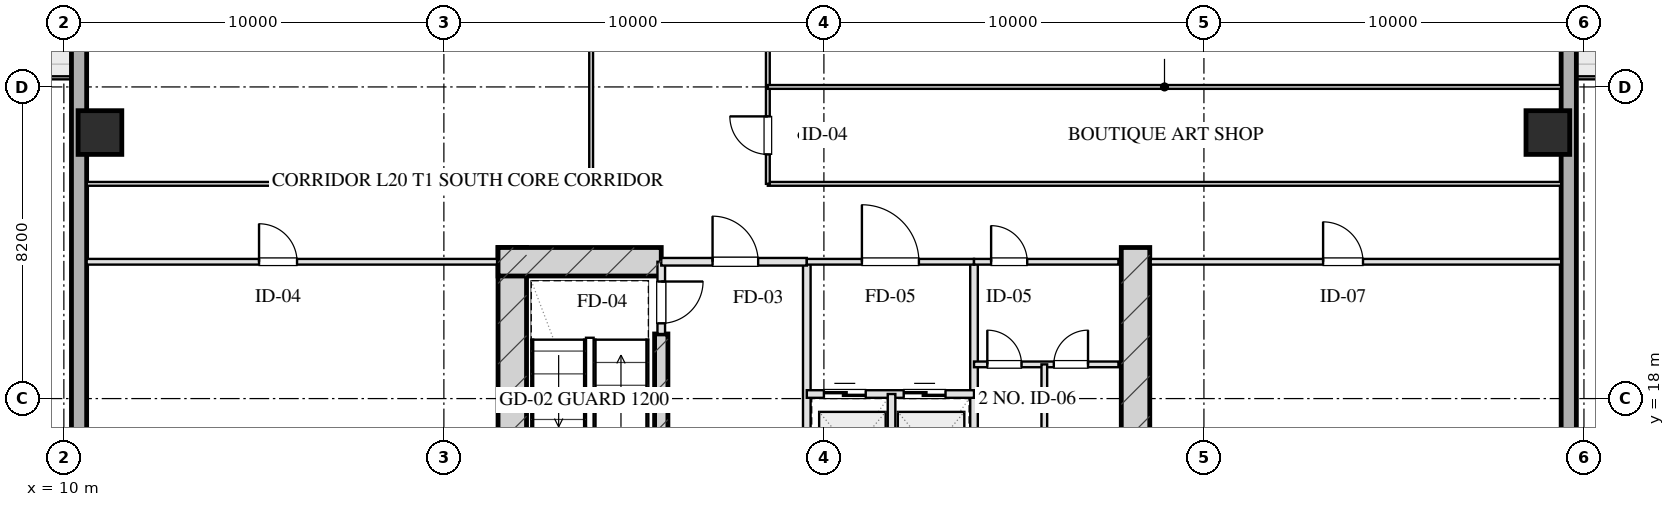
"""IFC4 building model, lengths in metres.
Left out: names, types, materials, properties, quantities, classifications, styles, units other than length and angle.
Written with IfcOpenShell. Run it as: python <this file> out.ifc"""

import sys

from ifc_helpers import new_model, si_unit, direction, frame, frame_2d, origin, origin_2d, place, context, subcontext, project, spatial, rectangle, hollow_rectangle, extrude, element, fill, save


model = new_model("IFC4")
c1 = context("Model", 3, precision=1e-05, world=origin(), true_north=direction((0.0, 1.0)))
c2 = subcontext(c1, "Body", "Model", "MODEL_VIEW")
j1 = project(units=[si_unit("LENGTHUNIT", "METRE"), si_unit("PLANEANGLEUNIT", "RADIAN")], contexts=[c1])
p1 = place(None, origin())
s1 = spatial("IfcSite", under=j1, at=p1, CompositionType="ELEMENT")
p2 = place(p1, origin())
s2 = spatial("IfcBuilding", under=s1, at=p2, CompositionType="ELEMENT")
p3 = place(p2, frame((0.0, 0.0, 81.65)))
s3 = spatial("IfcBuildingStorey", under=s2, at=p3, CompositionType="ELEMENT", Elevation=81.65)
for number, where, z_axis, x_axis in (
    (1, (21.8, 21.975, 0.0), (0.0, 0.0, 1.0), (0.0, -1.0, 0.0)),
    (2, (38.2, 21.975, 0.0), (0.0, 0.0, 1.0), (0.0, -1.0, 0.0)),
):
    element("IfcWall", number, at=place(p3, frame(where, z_axis=z_axis, x_axis=x_axis)), inside=s3, PredefinedType="SHEAR", context=c2, shape_type="SweptSolid", body=[
        extrude(rectangle(XDim=9.63, YDim=0.75, at=frame_2d((4.815, 0.0))), origin(), (0.0, 0.0, 1.0), 3.45),
    ])
p4 = place(p3, frame((25.72, 19.7, 0.0), z_axis=(0.0, 0.0, 1.0), x_axis=(0.0, -1.0, 0.0)))
e3 = element("IfcWall", 3, at=p4, inside=s3, PredefinedType="SHEAR", context=c2, shape_type="SweptSolid", body=[
    extrude(rectangle(XDim=6.98, YDim=0.35, at=frame_2d((3.49, 0.0))), origin(), (0.0, 0.0, 1.0), 3.45),
])
p5 = place(p3, frame((21.425, 21.6, 0.0), z_axis=(0.0, 0.0, 1.0), x_axis=(1.0, 0.0, 0.0)))
e4 = element("IfcWall", 4, at=p5, inside=s3, PredefinedType="SHEAR", context=c2, shape_type="SweptSolid", body=[
    extrude(rectangle(XDim=4.295, YDim=0.75, at=frame_2d((2.147, 0.0))), origin(), (0.0, 0.0, 1.0), 3.45),
])
for number, where, z_axis, x_axis in (
    (5, (10.95, 25.0, 0.0), (0.0, 0.0, 1.0), (1.0, 0.0, 0.0)),
    (6, (49.05, 25.0, 0.0), (0.0, 0.0, 1.0), (1.0, 0.0, 0.0)),
):
    element("IfcColumn", number, at=place(p3, frame(where, z_axis=z_axis, x_axis=x_axis)), inside=s3, PredefinedType="COLUMN", context=c2, shape_type="SweptSolid", body=[
        extrude(hollow_rectangle(XDim=1.15, YDim=1.15, WallThickness=0.04, at=origin_2d()), origin(), (0.0, 0.0, 1.0), 3.451),
    ])
p6 = place(p3, frame((10.4, 7.2, 0.0), z_axis=(0.0, 0.0, 1.0), x_axis=(0.0, 1.0, 0.0)))
e7 = element("IfcWall", 7, at=p6, inside=s3, PredefinedType="SOLIDWALL", context=c2, shape_type="SweptSolid", body=[
    extrude(rectangle(XDim=53.6, YDim=0.4, at=frame_2d((26.8, 0.0))), origin(), (0.0, 0.0, 1.0), 2.61),
])
p7 = place(p6, frame((28.2, 0.0, 0.75)))
e8 = element("IfcOpeningElement", 8, at=p7, cuts=e7, PredefinedType="OPENING", context=c2, shape_type="SweptSolid", body=[
    extrude(rectangle(XDim=2.4, YDim=1.46, at=frame_2d((1.2, 0.73))), frame((0.0, 0.21, 0.0), z_axis=(0.0, -1.0, 0.0), x_axis=(1.0, 0.0, 0.0)), (0.0, 0.0, 1.0), 0.42),
])
p8 = place(p6, frame((32.0, 0.0, 0.75)))
e9 = element("IfcOpeningElement", 9, at=p8, cuts=e7, PredefinedType="OPENING", context=c2, shape_type="SweptSolid", body=[
    extrude(rectangle(XDim=2.4, YDim=1.46, at=frame_2d((1.2, 0.73))), frame((0.0, 0.21, 0.0), z_axis=(0.0, -1.0, 0.0), x_axis=(1.0, 0.0, 0.0)), (0.0, 0.0, 1.0), 0.42),
])
p9 = place(p6, frame((21.85, 0.0, 0.0)))
e10 = element("IfcOpeningElement", 10, at=p9, cuts=e7, PredefinedType="OPENING", context=c2, shape_type="SweptSolid", body=[
    extrude(rectangle(XDim=1.1, YDim=2.15, at=frame_2d((0.55, 1.075))), frame((0.0, 0.21, 0.0), z_axis=(0.0, -1.0, 0.0), x_axis=(1.0, 0.0, 0.0)), (0.0, 0.0, 1.0), 0.42),
])
p10 = place(p3, frame((49.6, 60.8, 0.0), z_axis=(0.0, 0.0, 1.0), x_axis=(0.0, -1.0, 0.0)))
e11 = element("IfcWall", 11, at=p10, inside=s3, PredefinedType="SOLIDWALL", context=c2, shape_type="SweptSolid", body=[
    extrude(rectangle(XDim=53.6, YDim=0.4, at=frame_2d((26.8, 0.0))), origin(), (0.0, 0.0, 1.0), 2.61),
])
p11 = place(p10, frame((32.05, 0.0, 0.0)))
e12 = element("IfcOpeningElement", 12, at=p11, cuts=e11, PredefinedType="OPENING", context=c2, shape_type="SweptSolid", body=[
    extrude(rectangle(XDim=1.1, YDim=2.15, at=frame_2d((0.55, 1.075))), frame((0.0, 0.21, 0.0), z_axis=(0.0, -1.0, 0.0), x_axis=(1.0, 0.0, 0.0)), (0.0, 0.0, 1.0), 0.42),
])
p12 = place(p3, frame((25.72, 21.6, 0.0), z_axis=(0.0, 0.0, 1.0), x_axis=(0.0, -1.0, 0.0)))
e13 = element("IfcWall", 13, at=p12, inside=s3, PredefinedType="PARTITIONING", context=c2, shape_type="SweptSolid", body=[
    extrude(rectangle(XDim=1.9, YDim=0.2, at=frame_2d((0.95, 0.0))), origin(), (0.0, 0.0, 1.0), 3.175),
])
p13 = place(p12, frame((0.52, 0.0, 0.0)))
e14 = element("IfcOpeningElement", 14, at=p13, cuts=e13, PredefinedType="OPENING", context=c2, shape_type="SweptSolid", body=[
    extrude(rectangle(XDim=1.1, YDim=2.05, at=frame_2d((0.55, 1.025))), frame((0.0, 0.11, 0.0), z_axis=(0.0, -1.0, 0.0), x_axis=(1.0, 0.0, 0.0)), (0.0, 0.0, 1.0), 0.22),
])
p14 = place(p3, frame((29.55, 21.6, 0.0), z_axis=(0.0, 0.0, 1.0), x_axis=(0.0, -1.0, 0.0)))
e15 = element("IfcWall", 15, at=p14, inside=s3, PredefinedType="PARTITIONING", context=c2, shape_type="SweptSolid", body=[
    extrude(rectangle(XDim=8.43, YDim=0.2, at=frame_2d((4.215, 0.0))), origin(), (0.0, 0.0, 1.0), 3.175),
])
p15 = place(p3, frame((25.72, 21.6, 0.0), z_axis=(0.0, 0.0, 1.0), x_axis=(1.0, 0.0, 0.0)))
e16 = element("IfcWall", 16, at=p15, inside=s3, PredefinedType="PARTITIONING", context=c2, shape_type="SweptSolid", body=[
    extrude(rectangle(XDim=3.83, YDim=0.2, at=frame_2d((1.915, 0.0))), origin(), (0.0, 0.0, 1.0), 3.175),
])
p16 = place(p15, frame((1.35, 0.0, 0.0)))
e17 = element("IfcOpeningElement", 17, at=p16, cuts=e16, PredefinedType="OPENING", context=c2, shape_type="SweptSolid", body=[
    extrude(rectangle(XDim=1.2, YDim=2.05, at=frame_2d((0.6, 1.025))), frame((0.0, 0.11, 0.0), z_axis=(0.0, -1.0, 0.0), x_axis=(1.0, 0.0, 0.0)), (0.0, 0.0, 1.0), 0.22),
])
p17 = place(p3, frame((33.95, 21.6, 0.0), z_axis=(0.0, 0.0, 1.0), x_axis=(0.0, -1.0, 0.0)))
e18 = element("IfcWall", 18, at=p17, inside=s3, PredefinedType="PARTITIONING", context=c2, shape_type="SweptSolid", body=[
    extrude(rectangle(XDim=8.43, YDim=0.2, at=frame_2d((4.215, 0.0))), origin(), (0.0, 0.0, 1.0), 3.175),
])
p18 = place(p3, frame((29.55, 21.6, 0.0), z_axis=(0.0, 0.0, 1.0), x_axis=(1.0, 0.0, 0.0)))
e19 = element("IfcWall", 19, at=p18, inside=s3, PredefinedType="PARTITIONING", context=c2, shape_type="SweptSolid", body=[
    extrude(rectangle(XDim=4.4, YDim=0.15, at=frame_2d((2.2, 0.0))), origin(), (0.0, 0.0, 1.0), 3.175),
])
p19 = place(p18, frame((1.45, 0.0, 0.0)))
e20 = element("IfcOpeningElement", 20, at=p19, cuts=e19, PredefinedType="OPENING", context=c2, shape_type="SweptSolid", body=[
    extrude(rectangle(XDim=1.5, YDim=2.05, at=frame_2d((0.75, 1.025))), frame((0.0, 0.085, 0.0), z_axis=(0.0, -1.0, 0.0), x_axis=(1.0, 0.0, 0.0)), (0.0, 0.0, 1.0), 0.17),
])
p20 = place(p3, frame((29.55, 18.12, 0.0), z_axis=(0.0, 0.0, 1.0), x_axis=(1.0, 0.0, 0.0)))
e21 = element("IfcWall", 21, at=p20, inside=s3, PredefinedType="PARTITIONING", context=c2, shape_type="SweptSolid", body=[
    extrude(rectangle(XDim=4.4, YDim=0.2, at=frame_2d((2.2, 0.0))), origin(), (0.0, 0.0, 1.0), 3.175),
])
p21 = place(p20, frame((0.45, 0.0, 0.0)))
e22 = element("IfcOpeningElement", 22, at=p21, cuts=e21, PredefinedType="OPENING", context=c2, shape_type="SweptSolid", body=[
    extrude(rectangle(XDim=1.1, YDim=2.05, at=frame_2d((0.55, 1.025))), frame((0.0, 0.11, 0.0), z_axis=(0.0, -1.0, 0.0), x_axis=(1.0, 0.0, 0.0)), (0.0, 0.0, 1.0), 0.22),
])
p22 = place(p20, frame((2.55, 0.0, 0.0)))
e23 = element("IfcOpeningElement", 23, at=p22, cuts=e21, PredefinedType="OPENING", context=c2, shape_type="SweptSolid", body=[
    extrude(rectangle(XDim=1.1, YDim=2.05, at=frame_2d((0.55, 1.025))), frame((0.0, 0.11, 0.0), z_axis=(0.0, -1.0, 0.0), x_axis=(1.0, 0.0, 0.0)), (0.0, 0.0, 1.0), 0.22),
])
p23 = place(p3, frame((31.78, 18.12, 0.0), z_axis=(0.0, 0.0, 1.0), x_axis=(0.0, -1.0, 0.0)))
e24 = element("IfcWall", 24, at=p23, inside=s3, PredefinedType="PARTITIONING", context=c2, shape_type="SweptSolid", body=[
    extrude(rectangle(XDim=4.95, YDim=0.2, at=frame_2d((2.475, 0.0))), origin(), (0.0, 0.0, 1.0), 3.175),
])
p24 = place(p3, frame((33.95, 21.6, 0.0), z_axis=(0.0, 0.0, 1.0), x_axis=(1.0, 0.0, 0.0)))
e25 = element("IfcWall", 25, at=p24, inside=s3, PredefinedType="PARTITIONING", context=c2, shape_type="SweptSolid", body=[
    extrude(rectangle(XDim=3.8, YDim=0.15, at=frame_2d((1.9, 0.0))), origin(), (0.0, 0.0, 1.0), 3.175),
])
p25 = place(p24, frame((0.45, 0.0, 0.0)))
e26 = element("IfcOpeningElement", 26, at=p25, cuts=e25, PredefinedType="OPENING", context=c2, shape_type="SweptSolid", body=[
    extrude(rectangle(XDim=0.95, YDim=2.05, at=frame_2d((0.475, 1.025))), frame((0.0, 0.085, 0.0), z_axis=(0.0, -1.0, 0.0), x_axis=(1.0, 0.0, 0.0)), (0.0, 0.0, 1.0), 0.17),
])
p26 = place(p3, frame((33.95, 18.9, 0.0), z_axis=(0.0, 0.0, 1.0), x_axis=(1.0, 0.0, 0.0)))
e27 = element("IfcWall", 27, at=p26, inside=s3, PredefinedType="PARTITIONING", context=c2, shape_type="SweptSolid", body=[
    extrude(rectangle(XDim=3.8, YDim=0.15, at=frame_2d((1.9, 0.0))), origin(), (0.0, 0.0, 1.0), 3.175),
])
p27 = place(p26, frame((0.35, 0.0, 0.0)))
e28 = element("IfcOpeningElement", 28, at=p27, cuts=e27, PredefinedType="OPENING", context=c2, shape_type="SweptSolid", body=[
    extrude(rectangle(XDim=0.9, YDim=2.05, at=frame_2d((0.45, 1.025))), frame((0.0, 0.085, 0.0), z_axis=(0.0, -1.0, 0.0), x_axis=(1.0, 0.0, 0.0)), (0.0, 0.0, 1.0), 0.17),
])
p28 = place(p26, frame((2.1, 0.0, 0.0)))
e29 = element("IfcOpeningElement", 29, at=p28, cuts=e27, PredefinedType="OPENING", context=c2, shape_type="SweptSolid", body=[
    extrude(rectangle(XDim=0.9, YDim=2.05, at=frame_2d((0.45, 1.025))), frame((0.0, 0.085, 0.0), z_axis=(0.0, -1.0, 0.0), x_axis=(1.0, 0.0, 0.0)), (0.0, 0.0, 1.0), 0.17),
])
p29 = place(p3, frame((35.8, 18.9, 0.0), z_axis=(0.0, 0.0, 1.0), x_axis=(0.0, -1.0, 0.0)))
e30 = element("IfcWall", 30, at=p29, inside=s3, PredefinedType="PARTITIONING", context=c2, shape_type="SweptSolid", body=[
    extrude(rectangle(XDim=5.73, YDim=0.15, at=frame_2d((2.865, 0.0))), origin(), (0.0, 0.0, 1.0), 3.175),
])
p30 = place(p3, frame((10.6, 21.6, 0.0), z_axis=(0.0, 0.0, 1.0), x_axis=(1.0, 0.0, 0.0)))
e31 = element("IfcWall", 31, at=p30, inside=s3, PredefinedType="PARTITIONING", context=c2, shape_type="SweptSolid", body=[
    extrude(rectangle(XDim=10.8, YDim=0.15, at=frame_2d((5.4, 0.0))), origin(), (0.0, 0.0, 1.0), 3.175),
])
p31 = place(p30, frame((4.536, 0.0, 0.0)))
e32 = element("IfcOpeningElement", 32, at=p31, cuts=e31, PredefinedType="OPENING", context=c2, shape_type="SweptSolid", body=[
    extrude(rectangle(XDim=1.0, YDim=2.05, at=frame_2d((0.5, 1.025))), frame((0.0, 0.085, 0.0), z_axis=(0.0, -1.0, 0.0), x_axis=(1.0, 0.0, 0.0)), (0.0, 0.0, 1.0), 0.17),
])
p32 = place(p3, frame((38.6, 21.6, 0.0), z_axis=(0.0, 0.0, 1.0), x_axis=(1.0, 0.0, 0.0)))
e33 = element("IfcWall", 33, at=p32, inside=s3, PredefinedType="PARTITIONING", context=c2, shape_type="SweptSolid", body=[
    extrude(rectangle(XDim=10.8, YDim=0.15, at=frame_2d((5.4, 0.0))), origin(), (0.0, 0.0, 1.0), 3.175),
])
p33 = place(p32, frame((4.536, 0.0, 0.0)))
e34 = element("IfcOpeningElement", 34, at=p33, cuts=e33, PredefinedType="OPENING", context=c2, shape_type="SweptSolid", body=[
    extrude(rectangle(XDim=1.05, YDim=2.05, at=frame_2d((0.525, 1.025))), frame((0.0, 0.085, 0.0), z_axis=(0.0, -1.0, 0.0), x_axis=(1.0, 0.0, 0.0)), (0.0, 0.0, 1.0), 0.17),
])
p34 = place(p3, frame((10.6, 23.65, 0.0), z_axis=(0.0, 0.0, 1.0), x_axis=(1.0, 0.0, 0.0)))
e35 = element("IfcWall", 35, at=p34, inside=s3, PredefinedType="MOVABLE", context=c2, shape_type="SweptSolid", body=[
    extrude(rectangle(XDim=13.275, YDim=0.1, at=frame_2d((6.637, 0.0))), origin(), (0.0, 0.0, 1.0), 3.175),
])
p35 = place(p3, frame((28.525, 23.65, 0.0), z_axis=(0.0, 0.0, 1.0), x_axis=(1.0, 0.0, 0.0)))
e36 = element("IfcWall", 36, at=p35, inside=s3, PredefinedType="MOVABLE", context=c2, shape_type="SweptSolid", body=[
    extrude(rectangle(XDim=20.875, YDim=0.1, at=frame_2d((10.438, 0.0))), origin(), (0.0, 0.0, 1.0), 3.175),
])
p36 = place(p3, frame((23.875, 23.65, 0.0), z_axis=(0.0, 0.0, 1.0), x_axis=(0.0, 1.0, 0.0)))
e37 = element("IfcWall", 37, at=p36, inside=s3, PredefinedType="MOVABLE", context=c2, shape_type="SweptSolid", body=[
    extrude(rectangle(XDim=20.7, YDim=0.1, at=frame_2d((10.35, 0.0))), origin(), (0.0, 0.0, 1.0), 3.175),
])
p37 = place(p36, frame((4.075, 0.0, 0.0)))
e38 = element("IfcOpeningElement", 38, at=p37, cuts=e37, PredefinedType="OPENING", context=c2, shape_type="SweptSolid", body=[
    extrude(rectangle(XDim=1.0, YDim=2.05, at=frame_2d((0.5, 1.025))), frame((0.0, 0.06, 0.0), z_axis=(0.0, -1.0, 0.0), x_axis=(1.0, 0.0, 0.0)), (0.0, 0.0, 1.0), 0.12),
])
p38 = place(p36, frame((14.425, 0.0, 0.0)))
e39 = element("IfcOpeningElement", 39, at=p38, cuts=e37, PredefinedType="OPENING", context=c2, shape_type="SweptSolid", body=[
    extrude(rectangle(XDim=1.0, YDim=2.05, at=frame_2d((0.5, 1.025))), frame((0.0, 0.06, 0.0), z_axis=(0.0, -1.0, 0.0), x_axis=(1.0, 0.0, 0.0)), (0.0, 0.0, 1.0), 0.12),
])
p39 = place(p3, frame((28.525, 23.65, 0.0), z_axis=(0.0, 0.0, 1.0), x_axis=(0.0, 1.0, 0.0)))
e40 = element("IfcWall", 40, at=p39, inside=s3, PredefinedType="MOVABLE", context=c2, shape_type="SweptSolid", body=[
    extrude(rectangle(XDim=20.7, YDim=0.1, at=frame_2d((10.35, 0.0))), origin(), (0.0, 0.0, 1.0), 3.175),
])
p40 = place(p39, frame((0.775, 0.0, 0.0)))
e41 = element("IfcOpeningElement", 41, at=p40, cuts=e40, PredefinedType="OPENING", context=c2, shape_type="SweptSolid", body=[
    extrude(rectangle(XDim=1.0, YDim=2.05, at=frame_2d((0.5, 1.025))), frame((0.0, 0.06, 0.0), z_axis=(0.0, -1.0, 0.0), x_axis=(1.0, 0.0, 0.0)), (0.0, 0.0, 1.0), 0.12),
])
p41 = place(p39, frame((3.95, 0.0, 0.0)))
e42 = element("IfcOpeningElement", 42, at=p41, cuts=e40, PredefinedType="OPENING", context=c2, shape_type="SweptSolid", body=[
    extrude(rectangle(XDim=1.0, YDim=2.05, at=frame_2d((0.5, 1.025))), frame((0.0, 0.06, 0.0), z_axis=(0.0, -1.0, 0.0), x_axis=(1.0, 0.0, 0.0)), (0.0, 0.0, 1.0), 0.12),
])
p42 = place(p39, frame((7.51, 0.0, 0.0)))
e43 = element("IfcOpeningElement", 43, at=p42, cuts=e40, PredefinedType="OPENING", context=c2, shape_type="SweptSolid", body=[
    extrude(rectangle(XDim=1.05, YDim=2.05, at=frame_2d((0.525, 1.025))), frame((0.0, 0.06, 0.0), z_axis=(0.0, -1.0, 0.0), x_axis=(1.0, 0.0, 0.0)), (0.0, 0.0, 1.0), 0.12),
])
p43 = place(p39, frame((11.51, 0.0, 0.0)))
e44 = element("IfcOpeningElement", 44, at=p43, cuts=e40, PredefinedType="OPENING", context=c2, shape_type="SweptSolid", body=[
    extrude(rectangle(XDim=1.0, YDim=2.05, at=frame_2d((0.5, 1.025))), frame((0.0, 0.06, 0.0), z_axis=(0.0, -1.0, 0.0), x_axis=(1.0, 0.0, 0.0)), (0.0, 0.0, 1.0), 0.12),
])
p44 = place(p39, frame((15.75, 0.0, 0.0)))
e45 = element("IfcOpeningElement", 45, at=p44, cuts=e40, PredefinedType="OPENING", context=c2, shape_type="SweptSolid", body=[
    extrude(rectangle(XDim=1.0, YDim=2.05, at=frame_2d((0.5, 1.025))), frame((0.0, 0.06, 0.0), z_axis=(0.0, -1.0, 0.0), x_axis=(1.0, 0.0, 0.0)), (0.0, 0.0, 1.0), 0.12),
])
p45 = place(p39, frame((19.185, 0.0, 0.0)))
e46 = element("IfcOpeningElement", 46, at=p45, cuts=e40, PredefinedType="OPENING", context=c2, shape_type="SweptSolid", body=[
    extrude(rectangle(XDim=1.0, YDim=2.05, at=frame_2d((0.5, 1.025))), frame((0.0, 0.06, 0.0), z_axis=(0.0, -1.0, 0.0), x_axis=(1.0, 0.0, 0.0)), (0.0, 0.0, 1.0), 0.12),
])
p46 = place(p3, frame((28.525, 26.2, 0.0), z_axis=(0.0, 0.0, 1.0), x_axis=(1.0, 0.0, 0.0)))
e47 = element("IfcWall", 47, at=p46, inside=s3, PredefinedType="MOVABLE", context=c2, shape_type="SweptSolid", body=[
    extrude(rectangle(XDim=20.875, YDim=0.1, at=frame_2d((10.438, 0.0))), origin(), (0.0, 0.0, 1.0), 3.175),
])
p47 = place(p13, origin())
e48 = element("IfcDoor", 48, at=p47, inside=s3, OperationType="SINGLE_SWING_LEFT", PredefinedType="DOOR", context=c2, shape_type="SweptSolid", body=[
    extrude(rectangle(XDim=1.1, YDim=2.05, at=frame_2d((0.55, 1.025))), frame((0.0, 0.025, 0.0), z_axis=(0.0, -1.0, 0.0), x_axis=(1.0, 0.0, 0.0)), (0.0, 0.0, 1.0), 0.05),
])
fill(e14, e48)
p48 = place(p16, origin())
e49 = element("IfcDoor", 49, at=p48, inside=s3, OperationType="SINGLE_SWING_LEFT", PredefinedType="DOOR", context=c2, shape_type="SweptSolid", body=[
    extrude(rectangle(XDim=1.2, YDim=2.05, at=frame_2d((0.6, 1.025))), frame((0.0, 0.025, 0.0), z_axis=(0.0, -1.0, 0.0), x_axis=(1.0, 0.0, 0.0)), (0.0, 0.0, 1.0), 0.05),
])
fill(e17, e49)
p49 = place(p19, origin())
e50 = element("IfcDoor", 50, at=p49, inside=s3, OperationType="SINGLE_SWING_LEFT", PredefinedType="DOOR", context=c2, shape_type="SweptSolid", body=[
    extrude(rectangle(XDim=1.5, YDim=2.05, at=frame_2d((0.75, 1.025))), frame((0.0, 0.025, 0.0), z_axis=(0.0, -1.0, 0.0), x_axis=(1.0, 0.0, 0.0)), (0.0, 0.0, 1.0), 0.05),
])
fill(e20, e50)
p50 = place(p21, origin())
e51 = element("IfcDoor", 51, at=p50, inside=s3, OperationType="DOUBLE_DOOR_SLIDING", PredefinedType="DOOR", context=c2, shape_type="SweptSolid", body=[
    extrude(rectangle(XDim=1.1, YDim=2.05, at=frame_2d((0.55, 1.025))), frame((0.0, 0.025, 0.0), z_axis=(0.0, -1.0, 0.0), x_axis=(1.0, 0.0, 0.0)), (0.0, 0.0, 1.0), 0.05),
])
fill(e22, e51)
p51 = place(p22, origin())
e52 = element("IfcDoor", 52, at=p51, inside=s3, OperationType="DOUBLE_DOOR_SLIDING", PredefinedType="DOOR", context=c2, shape_type="SweptSolid", body=[
    extrude(rectangle(XDim=1.1, YDim=2.05, at=frame_2d((0.55, 1.025))), frame((0.0, 0.025, 0.0), z_axis=(0.0, -1.0, 0.0), x_axis=(1.0, 0.0, 0.0)), (0.0, 0.0, 1.0), 0.05),
])
fill(e23, e52)
p52 = place(p25, origin())
e53 = element("IfcDoor", 53, at=p52, inside=s3, OperationType="SINGLE_SWING_LEFT", PredefinedType="DOOR", context=c2, shape_type="SweptSolid", body=[
    extrude(rectangle(XDim=0.95, YDim=2.05, at=frame_2d((0.475, 1.025))), frame((0.0, 0.025, 0.0), z_axis=(0.0, -1.0, 0.0), x_axis=(1.0, 0.0, 0.0)), (0.0, 0.0, 1.0), 0.05),
])
fill(e26, e53)
p53 = place(p27, origin())
e54 = element("IfcDoor", 54, at=p53, inside=s3, OperationType="SINGLE_SWING_LEFT", PredefinedType="DOOR", context=c2, shape_type="SweptSolid", body=[
    extrude(rectangle(XDim=0.9, YDim=2.05, at=frame_2d((0.45, 1.025))), frame((0.0, 0.025, 0.0), z_axis=(0.0, -1.0, 0.0), x_axis=(1.0, 0.0, 0.0)), (0.0, 0.0, 1.0), 0.05),
])
fill(e28, e54)
p54 = place(p28, origin())
e55 = element("IfcDoor", 55, at=p54, inside=s3, OperationType="SINGLE_SWING_RIGHT", PredefinedType="DOOR", context=c2, shape_type="SweptSolid", body=[
    extrude(rectangle(XDim=0.9, YDim=2.05, at=frame_2d((0.45, 1.025))), frame((0.0, 0.025, 0.0), z_axis=(0.0, -1.0, 0.0), x_axis=(1.0, 0.0, 0.0)), (0.0, 0.0, 1.0), 0.05),
])
fill(e29, e55)
p55 = place(p31, origin())
e56 = element("IfcDoor", 56, at=p55, inside=s3, OperationType="SINGLE_SWING_LEFT", PredefinedType="DOOR", context=c2, shape_type="SweptSolid", body=[
    extrude(rectangle(XDim=1.0, YDim=2.05, at=frame_2d((0.5, 1.025))), frame((0.0, 0.025, 0.0), z_axis=(0.0, -1.0, 0.0), x_axis=(1.0, 0.0, 0.0)), (0.0, 0.0, 1.0), 0.05),
])
fill(e32, e56)
p56 = place(p33, origin())
e57 = element("IfcDoor", 57, at=p56, inside=s3, OperationType="SINGLE_SWING_LEFT", PredefinedType="DOOR", context=c2, shape_type="SweptSolid", body=[
    extrude(rectangle(XDim=1.05, YDim=2.05, at=frame_2d((0.525, 1.025))), frame((0.0, 0.025, 0.0), z_axis=(0.0, -1.0, 0.0), x_axis=(1.0, 0.0, 0.0)), (0.0, 0.0, 1.0), 0.05),
])
fill(e34, e57)
p57 = place(p40, origin())
e58 = element("IfcDoor", 58, at=p57, inside=s3, OperationType="SINGLE_SWING_RIGHT", PredefinedType="DOOR", context=c2, shape_type="SweptSolid", body=[
    extrude(rectangle(XDim=1.0, YDim=2.05, at=frame_2d((0.5, 1.025))), frame((0.0, 0.025, 0.0), z_axis=(0.0, -1.0, 0.0), x_axis=(1.0, 0.0, 0.0)), (0.0, 0.0, 1.0), 0.05),
])
fill(e41, e58)
save(model, sys.argv[1])
